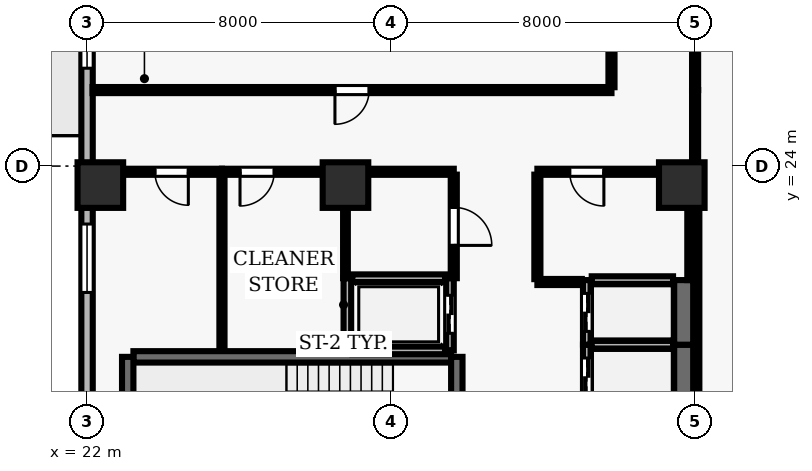
"""IFC4 building model, lengths in metres.
Left out: names, types, materials, properties, quantities, classifications, styles, units other than length and angle.
Written with IfcOpenShell. Run it as: python <this file> out.ifc"""

import sys

from ifc_helpers import new_model, si_unit, direction, frame, frame_2d, origin, origin_2d, place, context, subcontext, project, spatial, rectangle, extrude, element, fill, save


model = new_model("IFC4")
c1 = context("Model", 3, precision=1e-05, world=origin(), true_north=direction((0.0, 1.0)))
c2 = subcontext(c1, "Body", "Model", "MODEL_VIEW")
j1 = project(units=[si_unit("LENGTHUNIT", "METRE"), si_unit("PLANEANGLEUNIT", "RADIAN")], contexts=[c1])
p1 = place(None, origin())
s1 = spatial("IfcSite", under=j1, at=p1, CompositionType="ELEMENT")
p2 = place(p1, origin())
s2 = spatial("IfcBuilding", under=s1, at=p2, CompositionType="ELEMENT")
p3 = place(p2, frame((0.0, 0.0, 126.8)))
s3 = spatial("IfcBuildingStorey", under=s2, at=p3, CompositionType="ELEMENT", Elevation=126.8)
for number, where, z_axis, x_axis in (
    (1, (22.35, 23.5, 0.0), (0.0, 0.0, 1.0), (1.0, 0.0, 0.0)),
    (2, (28.8, 23.5, 0.0), (0.0, 0.0, 1.0), (1.0, 0.0, 0.0)),
    (3, (37.65, 23.5, 0.0), (0.0, 0.0, 1.0), (1.0, 0.0, 0.0)),
):
    element("IfcColumn", number, at=place(p3, frame(where, z_axis=z_axis, x_axis=x_axis)), inside=s3, PredefinedType="COLUMN", context=c2, shape_type="SweptSolid", body=[
        extrude(rectangle(XDim=1.2, YDim=1.2, at=origin_2d()), origin(), (0.0, 0.0, 1.0), 3.9),
    ])
p4 = place(p3, frame((22.0, 46.1, 0.0), z_axis=(0.0, 0.0, 1.0), x_axis=(0.0, -1.0, 0.0)))
e4 = element("IfcWall", 4, at=p4, inside=s3, PredefinedType="SOLIDWALL", context=c2, shape_type="SweptSolid", body=[
    extrude(rectangle(XDim=43.6, YDim=0.3, at=frame_2d((21.8, 0.0))), origin(), (0.0, 0.0, 1.0), 3.69),
])
p5 = place(p4, frame((12.7, 0.0, 0.0)))
e5 = element("IfcOpeningElement", 5, at=p5, cuts=e4, PredefinedType="OPENING", context=c2, shape_type="SweptSolid", body=[
    extrude(rectangle(XDim=1.0, YDim=2.2, at=frame_2d((0.5, 1.1))), frame((0.0, 0.16, 0.0), z_axis=(0.0, -1.0, 0.0), x_axis=(1.0, 0.0, 0.0)), (0.0, 0.0, 1.0), 0.32),
])
p6 = place(p4, frame((1.825, 0.0, 0.9)))
e6 = element("IfcOpeningElement", 6, at=p6, cuts=e4, PredefinedType="OPENING", context=c2, shape_type="SweptSolid", body=[
    extrude(rectangle(XDim=1.8, YDim=1.8, at=frame_2d((0.9, 0.9))), frame((0.0, 0.16, 0.0), z_axis=(0.0, -1.0, 0.0), x_axis=(1.0, 0.0, 0.0)), (0.0, 0.0, 1.0), 0.32),
])
p7 = place(p4, frame((6.825, 0.0, 0.9)))
e7 = element("IfcOpeningElement", 7, at=p7, cuts=e4, PredefinedType="OPENING", context=c2, shape_type="SweptSolid", body=[
    extrude(rectangle(XDim=1.8, YDim=1.8, at=frame_2d((0.9, 0.9))), frame((0.0, 0.16, 0.0), z_axis=(0.0, -1.0, 0.0), x_axis=(1.0, 0.0, 0.0)), (0.0, 0.0, 1.0), 0.32),
])
p8 = place(p4, frame((17.725, 0.0, 0.9)))
e8 = element("IfcOpeningElement", 8, at=p8, cuts=e4, PredefinedType="OPENING", context=c2, shape_type="SweptSolid", body=[
    extrude(rectangle(XDim=1.8, YDim=1.8, at=frame_2d((0.9, 0.9))), frame((0.0, 0.16, 0.0), z_axis=(0.0, -1.0, 0.0), x_axis=(1.0, 0.0, 0.0)), (0.0, 0.0, 1.0), 0.32),
])
p9 = place(p4, frame((23.625, 0.0, 0.9)))
e9 = element("IfcOpeningElement", 9, at=p9, cuts=e4, PredefinedType="OPENING", context=c2, shape_type="SweptSolid", body=[
    extrude(rectangle(XDim=1.8, YDim=1.8, at=frame_2d((0.9, 0.9))), frame((0.0, 0.16, 0.0), z_axis=(0.0, -1.0, 0.0), x_axis=(1.0, 0.0, 0.0)), (0.0, 0.0, 1.0), 0.32),
])
p10 = place(p4, frame((28.625, 0.0, 0.9)))
e10 = element("IfcOpeningElement", 10, at=p10, cuts=e4, PredefinedType="OPENING", context=c2, shape_type="SweptSolid", body=[
    extrude(rectangle(XDim=1.8, YDim=1.8, at=frame_2d((0.9, 0.9))), frame((0.0, 0.16, 0.0), z_axis=(0.0, -1.0, 0.0), x_axis=(1.0, 0.0, 0.0)), (0.0, 0.0, 1.0), 0.32),
])
p11 = place(p4, frame((34.525, 0.0, 0.9)))
e11 = element("IfcOpeningElement", 11, at=p11, cuts=e4, PredefinedType="OPENING", context=c2, shape_type="SweptSolid", body=[
    extrude(rectangle(XDim=1.8, YDim=1.8, at=frame_2d((0.9, 0.9))), frame((0.0, 0.16, 0.0), z_axis=(0.0, -1.0, 0.0), x_axis=(1.0, 0.0, 0.0)), (0.0, 0.0, 1.0), 0.32),
])
p12 = place(p3, frame((31.58, 18.98, 0.0), z_axis=(0.0, 0.0, 1.0), x_axis=(-1.0, 0.0, 0.0)))
e12 = element("IfcWall", 12, at=p12, inside=s3, PredefinedType="SHEAR", context=c2, shape_type="SweptSolid", body=[
    extrude(rectangle(XDim=8.36, YDim=0.3, at=frame_2d((4.18, 0.0))), origin(), (0.0, 0.0, 1.0), 3.69),
])
p13 = place(p3, frame((23.07, 18.98, 0.0), z_axis=(0.0, 0.0, 1.0), x_axis=(0.0, -1.0, 0.0)))
e13 = element("IfcWall", 13, at=p13, inside=s3, PredefinedType="SHEAR", context=c2, shape_type="SweptSolid", body=[
    extrude(rectangle(XDim=3.51, YDim=0.3, at=frame_2d((1.755, 0.0))), origin(), (0.0, 0.0, 1.0), 3.69),
])
p14 = place(p3, frame((31.73, 15.47, 0.0), z_axis=(0.0, 0.0, 1.0), x_axis=(0.0, 1.0, 0.0)))
e14 = element("IfcWall", 14, at=p14, inside=s3, PredefinedType="SHEAR", context=c2, shape_type="SweptSolid", body=[
    extrude(rectangle(XDim=3.51, YDim=0.3, at=frame_2d((1.755, 0.0))), origin(), (0.0, 0.0, 1.0), 3.69),
])
p15 = place(p14, frame((1.18, 0.0, 0.0)))
e15 = element("IfcOpeningElement", 15, at=p15, cuts=e14, PredefinedType="OPENING", context=c2, shape_type="SweptSolid", body=[
    extrude(rectangle(XDim=1.15, YDim=2.15, at=frame_2d((0.575, 1.075))), frame((0.0, 0.16, 0.0), z_axis=(0.0, -1.0, 0.0), x_axis=(1.0, 0.0, 0.0)), (0.0, 0.0, 1.0), 0.32),
])
p16 = place(p3, frame((35.15, 19.3, 0.0), z_axis=(0.0, 0.0, 1.0), x_axis=(0.0, -1.0, 0.0)))
e16 = element("IfcWall", 16, at=p16, inside=s3, PredefinedType="SOLIDWALL", context=c2, shape_type="SweptSolid", body=[
    extrude(rectangle(XDim=1.7, YDim=0.2, at=frame_2d((0.85, 0.0))), origin(), (0.0, 0.0, 1.0), 3.69),
])
p17 = place(p16, frame((0.35, 0.0, 0.0)))
e17 = element("IfcOpeningElement", 17, at=p17, cuts=e16, PredefinedType="OPENING", context=c2, shape_type="SweptSolid", body=[
    extrude(rectangle(XDim=1.0, YDim=2.1, at=frame_2d((0.5, 1.05))), frame((0.0, 0.11, 0.0), z_axis=(0.0, -1.0, 0.0), x_axis=(1.0, 0.0, 0.0)), (0.0, 0.0, 1.0), 0.22),
])
p18 = place(p3, frame((37.7, 17.6, 0.0), z_axis=(0.0, 0.0, 1.0), x_axis=(0.0, 1.0, 0.0)))
e18 = element("IfcWall", 18, at=p18, inside=s3, PredefinedType="SHEAR", context=c2, shape_type="SweptSolid", body=[
    extrude(rectangle(XDim=1.7, YDim=0.5, at=frame_2d((0.85, 0.0))), origin(), (0.0, 0.0, 1.0), 3.69),
])
p19 = place(p3, frame((37.42, 19.3, 0.0), z_axis=(0.0, 0.0, 1.0), x_axis=(-1.0, 0.0, 0.0)))
e19 = element("IfcWall", 19, at=p19, inside=s3, PredefinedType="SOLIDWALL", context=c2, shape_type="SweptSolid", body=[
    extrude(rectangle(XDim=2.14, YDim=0.2, at=frame_2d((1.07, 0.0))), origin(), (0.0, 0.0, 1.0), 3.69),
])
p20 = place(p3, frame((35.15, 21.0, 0.0), z_axis=(0.0, 0.0, 1.0), x_axis=(0.0, -1.0, 0.0)))
e20 = element("IfcWall", 20, at=p20, inside=s3, PredefinedType="SOLIDWALL", context=c2, shape_type="SweptSolid", body=[
    extrude(rectangle(XDim=1.7, YDim=0.2, at=frame_2d((0.85, 0.0))), origin(), (0.0, 0.0, 1.0), 3.69),
])
p21 = place(p20, frame((0.35, 0.0, 0.0)))
e21 = element("IfcOpeningElement", 21, at=p21, cuts=e20, PredefinedType="OPENING", context=c2, shape_type="SweptSolid", body=[
    extrude(rectangle(XDim=1.0, YDim=2.1, at=frame_2d((0.5, 1.05))), frame((0.0, 0.11, 0.0), z_axis=(0.0, -1.0, 0.0), x_axis=(1.0, 0.0, 0.0)), (0.0, 0.0, 1.0), 0.22),
])
p22 = place(p3, frame((37.7, 19.3, 0.0), z_axis=(0.0, 0.0, 1.0), x_axis=(0.0, 1.0, 0.0)))
e22 = element("IfcWall", 22, at=p22, inside=s3, PredefinedType="SHEAR", context=c2, shape_type="SweptSolid", body=[
    extrude(rectangle(XDim=1.7, YDim=0.5, at=frame_2d((0.85, 0.0))), origin(), (0.0, 0.0, 1.0), 3.69),
])
p23 = place(p3, frame((37.42, 21.0, 0.0), z_axis=(0.0, 0.0, 1.0), x_axis=(-1.0, 0.0, 0.0)))
e23 = element("IfcWall", 23, at=p23, inside=s3, PredefinedType="SOLIDWALL", context=c2, shape_type="SweptSolid", body=[
    extrude(rectangle(XDim=2.14, YDim=0.2, at=frame_2d((1.07, 0.0))), origin(), (0.0, 0.0, 1.0), 3.69),
])
p24 = place(p3, frame((28.85, 21.05, 0.0), z_axis=(0.0, 0.0, 1.0), x_axis=(0.0, -1.0, 0.0)))
e24 = element("IfcWall", 24, at=p24, inside=s3, PredefinedType="SOLIDWALL", context=c2, shape_type="SweptSolid", body=[
    extrude(rectangle(XDim=1.9, YDim=0.2, at=frame_2d((0.95, 0.0))), origin(), (0.0, 0.0, 1.0), 3.69),
])
p25 = place(p3, frame((31.55, 19.15, 0.0), z_axis=(0.0, 0.0, 1.0), x_axis=(0.0, 1.0, 0.0)))
e25 = element("IfcWall", 25, at=p25, inside=s3, PredefinedType="SOLIDWALL", context=c2, shape_type="SweptSolid", body=[
    extrude(rectangle(XDim=1.9, YDim=0.2, at=frame_2d((0.95, 0.0))), origin(), (0.0, 0.0, 1.0), 3.69),
])
p26 = place(p25, frame((0.45, 0.0, 0.0)))
e26 = element("IfcOpeningElement", 26, at=p26, cuts=e25, PredefinedType="OPENING", context=c2, shape_type="SweptSolid", body=[
    extrude(rectangle(XDim=1.0, YDim=2.1, at=frame_2d((0.5, 1.05))), frame((0.0, 0.11, 0.0), z_axis=(0.0, -1.0, 0.0), x_axis=(1.0, 0.0, 0.0)), (0.0, 0.0, 1.0), 0.22),
])
for number, where, z_axis, x_axis in (
    (27, (28.98, 19.15, 0.0), (0.0, 0.0, 1.0), (1.0, 0.0, 0.0)),
    (28, (31.42, 21.05, 0.0), (0.0, 0.0, 1.0), (-1.0, 0.0, 0.0)),
):
    element("IfcWall", number, at=place(p3, frame(where, z_axis=z_axis, x_axis=x_axis)), inside=s3, PredefinedType="SOLIDWALL", context=c2, shape_type="SweptSolid", body=[
        extrude(rectangle(XDim=2.44, YDim=0.2, at=frame_2d((1.22, 0.0))), origin(), (0.0, 0.0, 1.0), 3.69),
    ])
p27 = place(p3, frame((25.55, 23.85, 0.0), z_axis=(0.0, 0.0, 1.0), x_axis=(-1.0, 0.0, 0.0)))
e29 = element("IfcWall", 29, at=p27, inside=s3, PredefinedType="PARTITIONING", context=c2, shape_type="SweptSolid", body=[
    extrude(rectangle(XDim=3.35, YDim=0.16, at=frame_2d((1.675, 0.0))), origin(), (0.0, 0.0, 1.0), 3.074),
])
p28 = place(p27, frame((0.885, 0.0, 0.0)))
e30 = element("IfcOpeningElement", 30, at=p28, cuts=e29, PredefinedType="OPENING", context=c2, shape_type="SweptSolid", body=[
    extrude(rectangle(XDim=0.88, YDim=2.1, at=frame_2d((0.44, 1.05))), frame((0.0, 0.09, 0.0), z_axis=(0.0, -1.0, 0.0), x_axis=(1.0, 0.0, 0.0)), (0.0, 0.0, 1.0), 0.18),
])
p29 = place(p3, frame((28.8, 23.85, 0.0), z_axis=(0.0, 0.0, 1.0), x_axis=(-1.0, 0.0, 0.0)))
e31 = element("IfcWall", 31, at=p29, inside=s3, PredefinedType="PARTITIONING", context=c2, shape_type="SweptSolid", body=[
    extrude(rectangle(XDim=3.25, YDim=0.16, at=frame_2d((1.625, 0.0))), origin(), (0.0, 0.0, 1.0), 3.074),
])
p30 = place(p29, frame((1.875, 0.0, 0.0)))
e32 = element("IfcOpeningElement", 32, at=p30, cuts=e31, PredefinedType="OPENING", context=c2, shape_type="SweptSolid", body=[
    extrude(rectangle(XDim=0.9, YDim=2.1, at=frame_2d((0.45, 1.05))), frame((0.0, 0.09, 0.0), z_axis=(0.0, -1.0, 0.0), x_axis=(1.0, 0.0, 0.0)), (0.0, 0.0, 1.0), 0.18),
])
p31 = place(p3, frame((31.65, 23.85, 0.0), z_axis=(0.0, 0.0, 1.0), x_axis=(-1.0, 0.0, 0.0)))
e33 = element("IfcWall", 33, at=p31, inside=s3, PredefinedType="PARTITIONING", context=c2, shape_type="SweptSolid", body=[
    extrude(rectangle(XDim=2.85, YDim=0.16, at=frame_2d((1.425, 0.0))), origin(), (0.0, 0.0, 1.0), 3.074),
])
p32 = place(p3, frame((35.02, 20.95, 0.0), z_axis=(0.0, 0.0, 1.0), x_axis=(-1.0, 0.0, 0.0)))
e34 = element("IfcWall", 34, at=p32, inside=s3, PredefinedType="PARTITIONING", context=c2, shape_type="SweptSolid", body=[
    extrude(rectangle(XDim=1.17, YDim=0.16, at=frame_2d((0.585, 0.0))), origin(), (0.0, 0.0, 1.0), 3.69),
])
p33 = place(p3, frame((35.8, 26.0, 0.0), z_axis=(0.0, 0.0, 1.0), x_axis=(-1.0, 0.0, 0.0)))
e35 = element("IfcWall", 35, at=p33, inside=s3, PredefinedType="PARTITIONING", context=c2, shape_type="SweptSolid", body=[
    extrude(rectangle(XDim=13.655, YDim=0.16, at=frame_2d((6.828, 0.0))), origin(), (0.0, 0.0, 1.0), 3.69),
])
p34 = place(p33, frame((6.377, 0.0, 0.0)))
e36 = element("IfcOpeningElement", 36, at=p34, cuts=e35, PredefinedType="OPENING", context=c2, shape_type="SweptSolid", body=[
    extrude(rectangle(XDim=0.9, YDim=2.1, at=frame_2d((0.45, 1.05))), frame((0.0, 0.09, 0.0), z_axis=(0.0, -1.0, 0.0), x_axis=(1.0, 0.0, 0.0)), (0.0, 0.0, 1.0), 0.18),
])
p35 = place(p3, frame((37.85, 23.85, 0.0), z_axis=(0.0, 0.0, 1.0), x_axis=(-1.0, 0.0, 0.0)))
e37 = element("IfcWall", 37, at=p35, inside=s3, PredefinedType="PARTITIONING", context=c2, shape_type="SweptSolid", body=[
    extrude(rectangle(XDim=4.0, YDim=0.16, at=frame_2d((2.0, 0.0))), origin(), (0.0, 0.0, 1.0), 3.074),
])
p36 = place(p35, frame((2.25, 0.0, 0.0)))
e38 = element("IfcOpeningElement", 38, at=p36, cuts=e37, PredefinedType="OPENING", context=c2, shape_type="SweptSolid", body=[
    extrude(rectangle(XDim=0.9, YDim=2.1, at=frame_2d((0.45, 1.05))), frame((0.0, 0.09, 0.0), z_axis=(0.0, -1.0, 0.0), x_axis=(1.0, 0.0, 0.0)), (0.0, 0.0, 1.0), 0.18),
])
p37 = place(p3, frame((25.55, 19.16, 0.0), z_axis=(0.0, 0.0, 1.0), x_axis=(0.0, 1.0, 0.0)))
e39 = element("IfcWall", 39, at=p37, inside=s3, PredefinedType="PARTITIONING", context=c2, shape_type="SweptSolid", body=[
    extrude(rectangle(XDim=4.615, YDim=0.135, at=frame_2d((2.308, 0.0))), origin(), (0.0, 0.0, 1.0), 3.69),
])
p38 = place(p3, frame((28.8, 23.775, 0.0), z_axis=(0.0, 0.0, 1.0), x_axis=(0.0, -1.0, 0.0)))
e40 = element("IfcWall", 40, at=p38, inside=s3, PredefinedType="PARTITIONING", context=c2, shape_type="SweptSolid", body=[
    extrude(rectangle(XDim=2.725, YDim=0.125, at=frame_2d((1.362, 0.0))), origin(), (0.0, 0.0, 1.0), 3.69),
])
p39 = place(p3, frame((31.65, 23.775, 0.0), z_axis=(0.0, 0.0, 1.0), x_axis=(0.0, -1.0, 0.0)))
e41 = element("IfcWall", 41, at=p39, inside=s3, PredefinedType="PARTITIONING", context=c2, shape_type="SweptSolid", body=[
    extrude(rectangle(XDim=2.725, YDim=0.16, at=frame_2d((1.362, 0.0))), origin(), (0.0, 0.0, 1.0), 3.69),
])
p40 = place(p39, frame((0.862, 0.0, 0.0)))
e42 = element("IfcOpeningElement", 42, at=p40, cuts=e41, PredefinedType="OPENING", context=c2, shape_type="SweptSolid", body=[
    extrude(rectangle(XDim=1.0, YDim=2.1, at=frame_2d((0.5, 1.05))), frame((0.0, 0.09, 0.0), z_axis=(0.0, -1.0, 0.0), x_axis=(1.0, 0.0, 0.0)), (0.0, 0.0, 1.0), 0.18),
])
p41 = place(p3, frame((33.85, 21.025, 0.0), z_axis=(0.0, 0.0, 1.0), x_axis=(0.0, 1.0, 0.0)))
e43 = element("IfcWall", 43, at=p41, inside=s3, PredefinedType="PARTITIONING", context=c2, shape_type="SweptSolid", body=[
    extrude(rectangle(XDim=2.75, YDim=0.16, at=frame_2d((1.375, 0.0))), origin(), (0.0, 0.0, 1.0), 3.69),
])
p42 = place(p3, frame((35.8, 36.793, 0.0), z_axis=(0.0, 0.0, 1.0), x_axis=(0.0, -1.0, 0.0)))
e44 = element("IfcWall", 44, at=p42, inside=s3, PredefinedType="PARTITIONING", context=c2, shape_type="SweptSolid", body=[
    extrude(rectangle(XDim=10.718, YDim=0.16, at=frame_2d((5.359, 0.0))), origin(), (0.0, 0.0, 1.0), 3.69),
])
p43 = place(p3, frame((37.85, 21.0, 0.0), z_axis=(0.0, 0.0, 1.0), x_axis=(0.0, 1.0, 0.0)))
e45 = element("IfcWall", 45, at=p43, inside=s3, PredefinedType="MOVABLE", context=c2, shape_type="SweptSolid", body=[
    extrude(rectangle(XDim=2.775, YDim=0.11, at=frame_2d((1.387, 0.0))), origin(), (0.0, 0.0, 1.0), 3.074),
])
p44 = place(p3, frame((38.0, 23.85, 0.0), z_axis=(0.0, 0.0, 1.0), x_axis=(0.0, 1.0, 0.0)))
e46 = element("IfcWall", 46, at=p44, inside=s3, PredefinedType="PARTITIONING", context=c2, shape_type="SweptSolid", body=[
    extrude(rectangle(XDim=2.15, YDim=0.16, at=frame_2d((1.075, 0.0))), origin(), (0.0, 0.0, 1.0), 3.074),
])
p45 = place(p3, frame((38.0, 26.0, 0.0), z_axis=(0.0, 0.0, 1.0), x_axis=(0.0, 1.0, 0.0)))
e47 = element("IfcWall", 47, at=p45, inside=s3, PredefinedType="PARTITIONING", context=c2, shape_type="SweptSolid", body=[
    extrude(rectangle(XDim=1.755, YDim=0.16, at=frame_2d((0.877, 0.0))), origin(), (0.0, 0.0, 1.0), 3.074),
])
p46 = place(p3, frame((38.05, 23.85, 0.0), z_axis=(0.0, 0.0, 1.0), x_axis=(0.0, -1.0, 0.0)))
e48 = element("IfcWall", 48, at=p46, inside=s3, PredefinedType="PARTITIONING", context=c2, shape_type="SweptSolid", body=[
    extrude(rectangle(XDim=7.775, YDim=0.125, at=frame_2d((3.888, 0.0))), origin(), (0.0, 0.0, 1.0), 3.074),
])
p47 = place(p8, origin())
e49 = element("IfcWindow", 49, at=p47, inside=s3, PartitioningType="SINGLE_PANEL", PredefinedType="WINDOW", context=c2, shape_type="SweptSolid", body=[
    extrude(rectangle(XDim=1.8, YDim=1.8, at=frame_2d((0.9, 0.9))), frame((0.0, 0.03, 0.0), z_axis=(0.0, -1.0, 0.0), x_axis=(1.0, 0.0, 0.0)), (0.0, 0.0, 1.0), 0.06),
])
fill(e8, e49)
p48 = place(p9, origin())
e50 = element("IfcWindow", 50, at=p48, inside=s3, PartitioningType="SINGLE_PANEL", PredefinedType="WINDOW", context=c2, shape_type="SweptSolid", body=[
    extrude(rectangle(XDim=1.8, YDim=1.8, at=frame_2d((0.9, 0.9))), frame((0.0, 0.03, 0.0), z_axis=(0.0, -1.0, 0.0), x_axis=(1.0, 0.0, 0.0)), (0.0, 0.0, 1.0), 0.06),
])
fill(e9, e50)
p49 = place(p17, origin())
e51 = element("IfcDoor", 51, at=p49, inside=s3, OperationType="DOUBLE_DOOR_SLIDING", PredefinedType="DOOR", context=c2, shape_type="SweptSolid", body=[
    extrude(rectangle(XDim=1.0, YDim=2.1, at=frame_2d((0.5, 1.05))), frame((0.0, 0.025, 0.0), z_axis=(0.0, -1.0, 0.0), x_axis=(1.0, 0.0, 0.0)), (0.0, 0.0, 1.0), 0.05),
])
fill(e17, e51)
p50 = place(p21, origin())
e52 = element("IfcDoor", 52, at=p50, inside=s3, OperationType="DOUBLE_DOOR_SLIDING", PredefinedType="DOOR", context=c2, shape_type="SweptSolid", body=[
    extrude(rectangle(XDim=1.0, YDim=2.1, at=frame_2d((0.5, 1.05))), frame((0.0, 0.025, 0.0), z_axis=(0.0, -1.0, 0.0), x_axis=(1.0, 0.0, 0.0)), (0.0, 0.0, 1.0), 0.05),
])
fill(e21, e52)
p51 = place(p26, origin())
e53 = element("IfcDoor", 53, at=p51, inside=s3, OperationType="DOUBLE_DOOR_SLIDING", PredefinedType="DOOR", context=c2, shape_type="SweptSolid", body=[
    extrude(rectangle(XDim=1.0, YDim=2.1, at=frame_2d((0.5, 1.05))), frame((0.0, 0.025, 0.0), z_axis=(0.0, -1.0, 0.0), x_axis=(1.0, 0.0, 0.0)), (0.0, 0.0, 1.0), 0.05),
])
fill(e26, e53)
p52 = place(p36, origin())
e54 = element("IfcDoor", 54, at=p52, inside=s3, OperationType="SINGLE_SWING_LEFT", PredefinedType="DOOR", context=c2, shape_type="SweptSolid", body=[
    extrude(rectangle(XDim=0.9, YDim=2.1, at=frame_2d((0.45, 1.05))), frame((0.0, 0.025, 0.0), z_axis=(0.0, -1.0, 0.0), x_axis=(1.0, 0.0, 0.0)), (0.0, 0.0, 1.0), 0.05),
])
fill(e38, e54)
p53 = place(p40, origin())
e55 = element("IfcDoor", 55, at=p53, inside=s3, OperationType="SINGLE_SWING_RIGHT", PredefinedType="DOOR", context=c2, shape_type="SweptSolid", body=[
    extrude(rectangle(XDim=1.0, YDim=2.1, at=frame_2d((0.5, 1.05))), frame((0.0, 0.025, 0.0), z_axis=(0.0, -1.0, 0.0), x_axis=(1.0, 0.0, 0.0)), (0.0, 0.0, 1.0), 0.05),
])
fill(e42, e55)
p54 = place(p28, origin())
e56 = element("IfcDoor", 56, at=p54, inside=s3, OperationType="SINGLE_SWING_LEFT", PredefinedType="DOOR", context=c2, shape_type="SweptSolid", body=[
    extrude(rectangle(XDim=0.88, YDim=2.1, at=frame_2d((0.44, 1.05))), frame((0.0, 0.025, 0.0), z_axis=(0.0, -1.0, 0.0), x_axis=(1.0, 0.0, 0.0)), (0.0, 0.0, 1.0), 0.05),
])
fill(e30, e56)
p55 = place(p30, origin())
e57 = element("IfcDoor", 57, at=p55, inside=s3, OperationType="SINGLE_SWING_RIGHT", PredefinedType="DOOR", context=c2, shape_type="SweptSolid", body=[
    extrude(rectangle(XDim=0.9, YDim=2.1, at=frame_2d((0.45, 1.05))), frame((0.0, 0.025, 0.0), z_axis=(0.0, -1.0, 0.0), x_axis=(1.0, 0.0, 0.0)), (0.0, 0.0, 1.0), 0.05),
])
fill(e32, e57)
p56 = place(p34, origin())
e58 = element("IfcDoor", 58, at=p56, inside=s3, OperationType="SINGLE_SWING_RIGHT", PredefinedType="DOOR", context=c2, shape_type="SweptSolid", body=[
    extrude(rectangle(XDim=0.9, YDim=2.1, at=frame_2d((0.45, 1.05))), frame((0.0, 0.025, 0.0), z_axis=(0.0, -1.0, 0.0), x_axis=(1.0, 0.0, 0.0)), (0.0, 0.0, 1.0), 0.05),
])
fill(e36, e58)
save(model, sys.argv[1])
